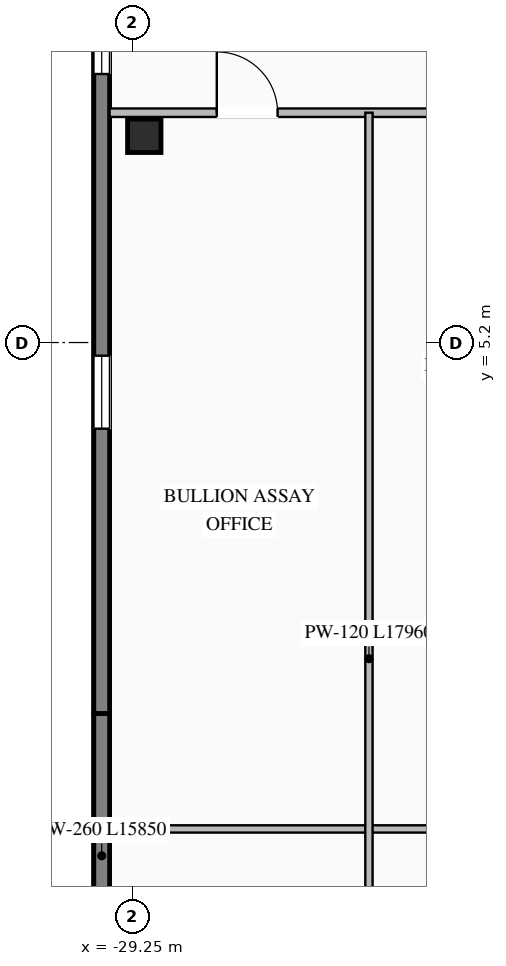
"""IFC4 building model, lengths in metres.
Left out: names, types, materials, properties, quantities, classifications, styles, units other than length and angle.
Written with IfcOpenShell. Run it as: python <this file> out.ifc"""

import sys

from ifc_helpers import new_model, si_unit, direction, frame, frame_2d, origin, origin_2d, place, context, subcontext, project, spatial, rectangle, i_section, extrude, element, fill, save


model = new_model("IFC4")
c1 = context("Model", 3, precision=1e-05, world=origin(), true_north=direction((0.0, 1.0)))
c2 = subcontext(c1, "Body", "Model", "MODEL_VIEW")
j1 = project(units=[si_unit("LENGTHUNIT", "METRE"), si_unit("PLANEANGLEUNIT", "RADIAN")], contexts=[c1])
p1 = place(None, origin())
s1 = spatial("IfcSite", under=j1, at=p1, CompositionType="ELEMENT")
p2 = place(p1, origin())
s2 = spatial("IfcBuilding", under=s1, at=p2, CompositionType="ELEMENT")
p3 = place(p2, frame((0.0, 0.0, 218.85)))
s3 = spatial("IfcBuildingStorey", under=s2, at=p3, CompositionType="ELEMENT", Elevation=218.85)
p4 = place(p3, frame((-29.05, 8.6, 0.0), z_axis=(0.0, 0.0, 1.0), x_axis=(1.0, 0.0, 0.0)))
e1 = element("IfcColumn", 1, at=p4, inside=s3, PredefinedType="COLUMN", context=c2, shape_type="SweptSolid", body=[
    extrude(i_section(OverallWidth=0.55, OverallDepth=0.55, WebThickness=0.024, FlangeThickness=0.036, at=origin_2d()), origin(), (0.0, 0.0, 1.0), 3.45),
])
p5 = place(p3, frame((-29.75, -16.75, 0.0), z_axis=(0.0, 0.0, 1.0), x_axis=(0.0, 1.0, 0.0)))
e2 = element("IfcWall", 2, at=p5, inside=s3, PredefinedType="STANDARD", context=c2, shape_type="SweptSolid", body=[
    extrude(rectangle(XDim=15.85, YDim=0.26, at=frame_2d((7.925, 0.0))), origin(), (0.0, 0.0, 1.0), 3.25),
])
p6 = place(p5, frame((4.133, 0.0, 0.76)))
e3 = element("IfcOpeningElement", 3, at=p6, cuts=e2, PredefinedType="OPENING", context=c2, shape_type="SweptSolid", body=[
    extrude(rectangle(XDim=1.2, YDim=1.95, at=frame_2d((0.6, 0.975))), frame((0.0, 0.14, 0.0), z_axis=(0.0, -1.0, 0.0), x_axis=(1.0, 0.0, 0.0)), (0.0, 0.0, 1.0), 0.28),
])
p7 = place(p5, frame((9.967, 0.0, 0.76)))
e4 = element("IfcOpeningElement", 4, at=p7, cuts=e2, PredefinedType="OPENING", context=c2, shape_type="SweptSolid", body=[
    extrude(rectangle(XDim=1.2, YDim=1.95, at=frame_2d((0.6, 0.975))), frame((0.0, 0.14, 0.0), z_axis=(0.0, -1.0, 0.0), x_axis=(1.0, 0.0, 0.0)), (0.0, 0.0, 1.0), 0.28),
])
p8 = place(p3, frame((-29.75, -0.9, 0.0), z_axis=(0.0, 0.0, 1.0), x_axis=(0.0, 1.0, 0.0)))
e5 = element("IfcWall", 5, at=p8, inside=s3, PredefinedType="STANDARD", context=c2, shape_type="SweptSolid", body=[
    extrude(rectangle(XDim=15.85, YDim=0.26, at=frame_2d((7.925, 0.0))), origin(), (0.0, 0.0, 1.0), 3.25),
])
p9 = place(p8, frame((4.683, 0.0, 0.76)))
e6 = element("IfcOpeningElement", 6, at=p9, cuts=e5, PredefinedType="OPENING", context=c2, shape_type="SweptSolid", body=[
    extrude(rectangle(XDim=1.2, YDim=1.95, at=frame_2d((0.6, 0.975))), frame((0.0, 0.14, 0.0), z_axis=(0.0, -1.0, 0.0), x_axis=(1.0, 0.0, 0.0)), (0.0, 0.0, 1.0), 0.28),
])
p10 = place(p8, frame((10.517, 0.0, 0.76)))
e7 = element("IfcOpeningElement", 7, at=p10, cuts=e5, PredefinedType="OPENING", context=c2, shape_type="SweptSolid", body=[
    extrude(rectangle(XDim=1.2, YDim=1.95, at=frame_2d((0.6, 0.975))), frame((0.0, 0.14, 0.0), z_axis=(0.0, -1.0, 0.0), x_axis=(1.0, 0.0, 0.0)), (0.0, 0.0, 1.0), 0.28),
])
p11 = place(p3, frame((-29.62, 8.98, 0.0), z_axis=(0.0, 0.0, 1.0), x_axis=(1.0, 0.0, 0.0)))
e8 = element("IfcWall", 8, at=p11, inside=s3, PredefinedType="STANDARD", context=c2, shape_type="SweptSolid", body=[
    extrude(rectangle(XDim=10.57, YDim=0.14, at=frame_2d((5.285, 0.0))), origin(), (0.0, 0.0, 1.0), 3.25),
])
p12 = place(p11, frame((1.762, 0.0, 0.0)))
e9 = element("IfcOpeningElement", 9, at=p12, cuts=e8, PredefinedType="OPENING", context=c2, shape_type="SweptSolid", body=[
    extrude(rectangle(XDim=1.0, YDim=2.08, at=frame_2d((0.5, 1.04))), frame((0.0, 0.08, 0.0), z_axis=(0.0, -1.0, 0.0), x_axis=(1.0, 0.0, 0.0)), (0.0, 0.0, 1.0), 0.16),
])
p13 = place(p11, frame((6.788, 0.0, 0.0)))
e10 = element("IfcOpeningElement", 10, at=p13, cuts=e8, PredefinedType="OPENING", context=c2, shape_type="SweptSolid", body=[
    extrude(rectangle(XDim=1.0, YDim=2.08, at=frame_2d((0.5, 1.04))), frame((0.0, 0.08, 0.0), z_axis=(0.0, -1.0, 0.0), x_axis=(1.0, 0.0, 0.0)), (0.0, 0.0, 1.0), 0.16),
])
p14 = place(p3, frame((-29.62, -2.8, 0.0), z_axis=(0.0, 0.0, 1.0), x_axis=(1.0, 0.0, 0.0)))
e11 = element("IfcWall", 11, at=p14, inside=s3, PredefinedType="STANDARD", context=c2, shape_type="SweptSolid", body=[
    extrude(rectangle(XDim=10.57, YDim=0.12, at=frame_2d((5.285, 0.0))), origin(), (0.0, 0.0, 1.0), 3.25),
])
p15 = place(p3, frame((-25.355, -8.98, 0.0), z_axis=(0.0, 0.0, 1.0), x_axis=(0.0, 1.0, 0.0)))
e12 = element("IfcWall", 12, at=p15, inside=s3, PredefinedType="STANDARD", context=c2, shape_type="SweptSolid", body=[
    extrude(rectangle(XDim=17.96, YDim=0.12, at=frame_2d((8.98, 0.0))), origin(), (0.0, 0.0, 1.0), 3.25),
])
p16 = place(p9, origin())
e13 = element("IfcWindow", 13, at=p16, inside=s3, PartitioningType="SINGLE_PANEL", PredefinedType="WINDOW", context=c2, shape_type="SweptSolid", body=[
    extrude(rectangle(XDim=1.2, YDim=1.95, at=frame_2d((0.6, 0.975))), frame((0.0, 0.03, 0.0), z_axis=(0.0, -1.0, 0.0), x_axis=(1.0, 0.0, 0.0)), (0.0, 0.0, 1.0), 0.06),
])
fill(e6, e13)
p17 = place(p10, origin())
e14 = element("IfcWindow", 14, at=p17, inside=s3, PartitioningType="SINGLE_PANEL", PredefinedType="WINDOW", context=c2, shape_type="SweptSolid", body=[
    extrude(rectangle(XDim=1.2, YDim=1.95, at=frame_2d((0.6, 0.975))), frame((0.0, 0.03, 0.0), z_axis=(0.0, -1.0, 0.0), x_axis=(1.0, 0.0, 0.0)), (0.0, 0.0, 1.0), 0.06),
])
fill(e7, e14)
p18 = place(p12, origin())
e15 = element("IfcDoor", 15, at=p18, inside=s3, OperationType="SINGLE_SWING_LEFT", PredefinedType="DOOR", context=c2, shape_type="SweptSolid", body=[
    extrude(rectangle(XDim=1.0, YDim=2.08, at=frame_2d((0.5, 1.04))), frame((0.0, 0.025, 0.0), z_axis=(0.0, -1.0, 0.0), x_axis=(1.0, 0.0, 0.0)), (0.0, 0.0, 1.0), 0.05),
])
fill(e9, e15)
save(model, sys.argv[1])
